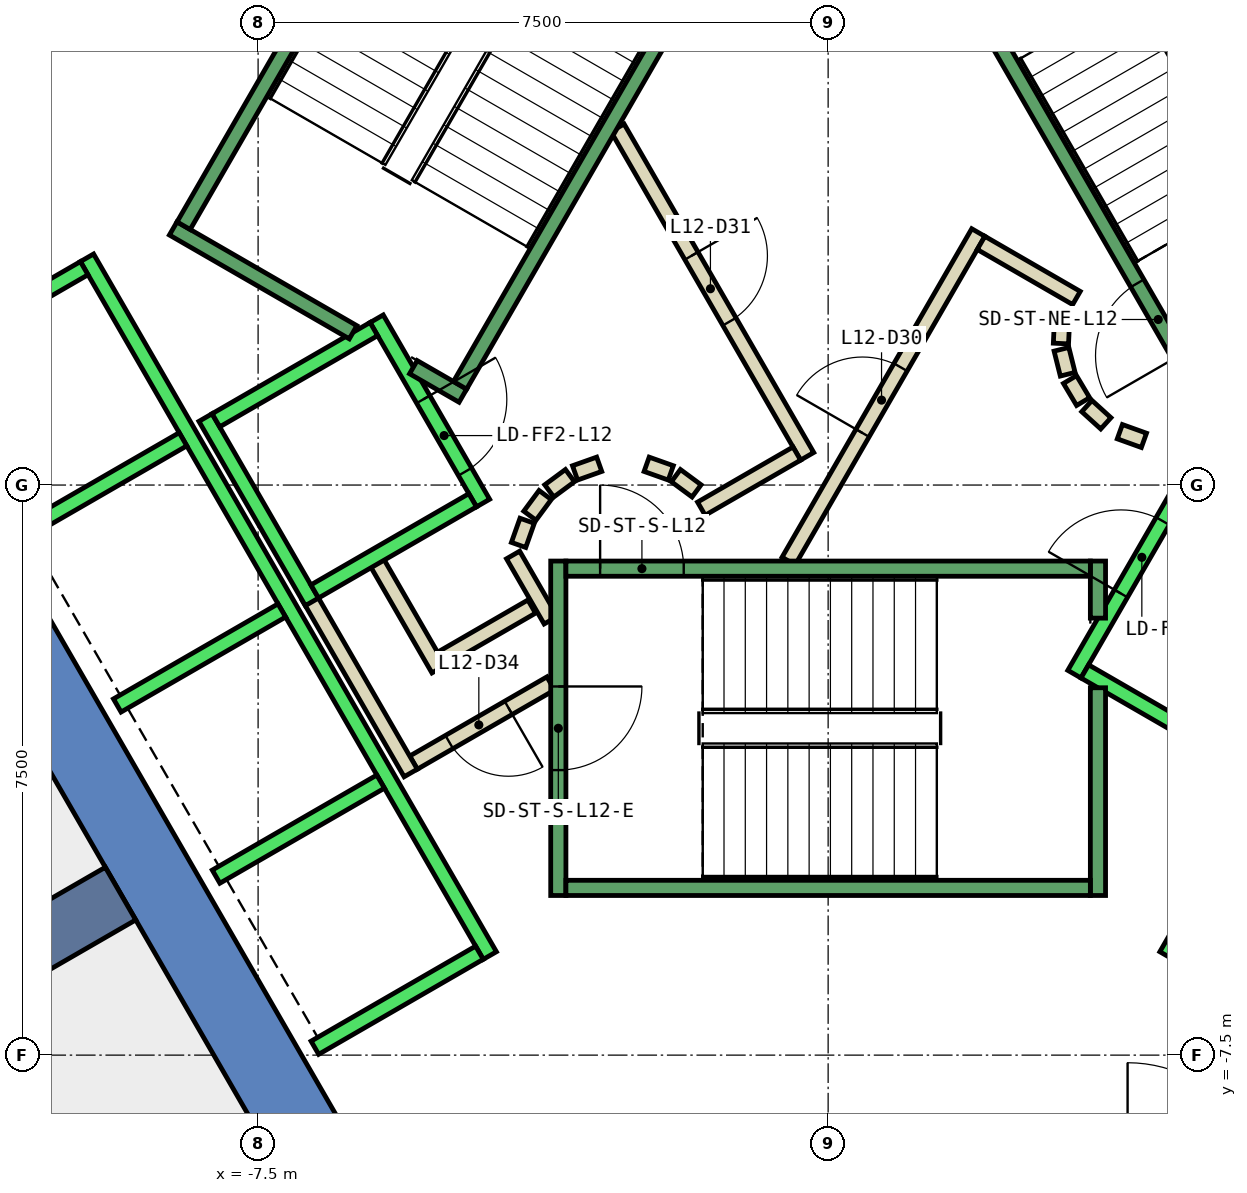
"""IFC4 building model, lengths in metres.
Left out: names, types, materials, properties, quantities, classifications, styles, units other than length and angle.
Written with IfcOpenShell. Run it as: python <this file> out.ifc"""

import sys

from ifc_helpers import new_model, si_unit, direction, frame, frame_2d, origin, place, context, subcontext, project, spatial, polyline, rectangle, outline, extrude, element, fill, save


model = new_model("IFC4")
c1 = context("Model", 3, precision=1e-05, world=origin(), true_north=direction((0.0, 1.0)))
c2 = subcontext(c1, "Body", "Model", "MODEL_VIEW")
j1 = project(units=[si_unit("LENGTHUNIT", "METRE"), si_unit("PLANEANGLEUNIT", "RADIAN")], contexts=[c1])
p1 = place(None, origin())
s1 = spatial("IfcSite", under=j1, at=p1, CompositionType="ELEMENT")
p2 = place(p1, origin())
s2 = spatial("IfcBuilding", under=s1, at=p2, CompositionType="ELEMENT")
p3 = place(p2, frame((0.0, 0.0, 60.2)))
s3 = spatial("IfcBuildingStorey", under=s2, at=p3, CompositionType="ELEMENT", Elevation=60.2)
p4 = place(p3, frame((0.0, 0.0, -0.4)))
e1 = element("IfcWall", 1, at=p4, inside=s3, PredefinedType="SHEAR", context=c2, shape_type="SweptSolid", body=[
    extrude(outline(polyline([(-12.267, 5.252), (-11.402, 4.752), (-6.351, 13.5), (-6.928, 14.5), (-12.267, 5.252)])), origin(), (0.0, 0.0, 1.0), 4.2),
])
p5 = place(p3, frame((0.0, 0.0, -0.4)))
e2 = element("IfcWall", 2, at=p5, inside=s3, PredefinedType="SHEAR", context=c2, shape_type="SweptSolid", body=[
    extrude(outline(polyline([(-13.856, 2.5), (-6.928, -9.5), (-6.351, -8.5), (-12.702, 2.5), (-13.856, 2.5)])), origin(), (0.0, 0.0, 1.0), 4.2),
])
p6 = place(p3, frame((-9.31, -5.375, -0.4), z_axis=(0.0, 0.0, 1.0), x_axis=(-0.866017533419, -0.500013631625, 0.0)))
e3 = element("IfcWall", 3, at=p6, inside=s3, PredefinedType="SHEAR", context=c2, shape_type="SweptSolid", body=[
    extrude(rectangle(XDim=9.0, YDim=0.8, at=frame_2d((4.5, 0.0))), origin(), (0.0, 0.0, 1.0), 4.2),
])
p7 = place(p3, frame((-3.9, -1.599, 0.0), z_axis=(0.0, 0.0, 1.0), x_axis=(-0.865969445389, -0.500096910261, 0.0)))
e4 = element("IfcWall", 4, at=p7, inside=s3, PredefinedType="PARTITIONING", context=c2, shape_type="SweptSolid", body=[
    extrude(rectangle(XDim=1.373, YDim=0.2, at=frame_2d((0.687, 0.0))), origin(), (0.0, 0.0, 1.0), 3.8),
])
p8 = place(p3, frame((-5.126, -2.422, 0.0), z_axis=(0.0, 0.0, 1.0), x_axis=(-0.500062241894, 0.865989465428, 0.0)))
e5 = element("IfcWall", 5, at=p8, inside=s3, PredefinedType="PARTITIONING", context=c2, shape_type="SweptSolid", body=[
    extrude(rectangle(XDim=1.7, YDim=0.2, at=frame_2d((0.85, 0.0))), origin(), (0.0, 0.0, 1.0), 3.8),
])
p9 = place(p3, frame((-3.65, -2.61, 0.0), z_axis=(0.0, 0.0, 1.0), x_axis=(-0.866072462134, -0.499918483688, 0.0)))
e6 = element("IfcWall", 6, at=p9, inside=s3, PredefinedType="PARTITIONING", context=c2, shape_type="SweptSolid", body=[
    extrude(rectangle(XDim=2.084, YDim=0.2, at=frame_2d((1.042, 0.0))), origin(), (0.0, 0.0, 1.0), 3.8),
])
p10 = place(p9, frame((0.642, 0.0, 0.0)))
e7 = element("IfcOpeningElement", 7, at=p10, cuts=e6, PredefinedType="OPENING", context=c2, shape_type="SweptSolid", body=[
    extrude(rectangle(XDim=0.9, YDim=2.1, at=frame_2d((0.45, 1.05))), frame((0.0, 0.11, 0.0), z_axis=(0.0, -1.0, 0.0), x_axis=(1.0, 0.0, 0.0)), (0.0, 0.0, 1.0), 0.22),
])
p11 = place(p3, frame((-5.492, -3.788, 0.0), z_axis=(0.0, 0.0, 1.0), x_axis=(-0.500008949224, 0.866020236886, 0.0)))
e8 = element("IfcWall", 8, at=p11, inside=s3, PredefinedType="PARTITIONING", context=c2, shape_type="SweptSolid", body=[
    extrude(rectangle(XDim=2.68, YDim=0.2, at=frame_2d((1.34, 0.0))), origin(), (0.0, 0.0, 1.0), 3.8),
])
p12 = place(p3, frame((-4.145, -0.92, 0.0), z_axis=(0.0, 0.0, 1.0), x_axis=(0.499743786207, -0.866173278362, 0.0)))
e9 = element("IfcWall", 9, at=p12, inside=s3, PredefinedType="PARTITIONING", context=c2, shape_type="SweptSolid", body=[
    extrude(rectangle(XDim=0.991, YDim=0.2, at=frame_2d((0.495, 0.0))), origin(), (0.0, 0.0, 1.0), 3.8),
])
p13 = place(p3, frame((-0.52, -1.0, 0.0), z_axis=(0.0, 0.0, 1.0), x_axis=(0.50011622646, 0.865958290007, 0.0)))
e10 = element("IfcWall", 10, at=p13, inside=s3, PredefinedType="PARTITIONING", context=c2, shape_type="SweptSolid", body=[
    extrude(rectangle(XDim=4.991, YDim=0.2, at=frame_2d((2.496, 0.0))), origin(), (0.0, 0.0, 1.0), 3.8),
])
p14 = place(p13, frame((1.945, 0.0, 0.0)))
e11 = element("IfcOpeningElement", 11, at=p14, cuts=e10, PredefinedType="OPENING", context=c2, shape_type="SweptSolid", body=[
    extrude(rectangle(XDim=1.0, YDim=2.1, at=frame_2d((0.5, 1.05))), frame((0.0, 0.11, 0.0), z_axis=(0.0, -1.0, 0.0), x_axis=(1.0, 0.0, 0.0)), (0.0, 0.0, 1.0), 0.22),
])
p15 = place(p3, frame((2.012, 3.186, 0.0), z_axis=(0.0, 0.0, 1.0), x_axis=(0.865891012941, -0.500232699559, 0.0)))
e12 = element("IfcWall", 12, at=p15, inside=s3, PredefinedType="PARTITIONING", context=c2, shape_type="SweptSolid", body=[
    extrude(rectangle(XDim=1.449, YDim=0.2, at=frame_2d((0.725, 0.0))), origin(), (0.0, 0.0, 1.0), 3.8),
])
p16 = place(p3, frame((3.079, 2.199, 0.0), z_axis=(0.0, 0.0, 1.0), x_axis=(-0.047771483479, -0.998858290933, 0.0)))
e13 = element("IfcWall", 13, at=p16, inside=s3, PredefinedType="PARTITIONING", context=c2, shape_type="SweptSolid", body=[
    extrude(rectangle(XDim=0.337, YDim=0.2, at=frame_2d((0.169, 0.0))), origin(), (0.0, 0.0, 1.0), 3.8),
])
p17 = place(p3, frame((3.07, 1.786, 0.0), z_axis=(0.0, 0.0, 1.0), x_axis=(0.242705583207, -0.970099994784, 0.0)))
e14 = element("IfcWall", 14, at=p17, inside=s3, PredefinedType="PARTITIONING", context=c2, shape_type="SweptSolid", body=[
    extrude(rectangle(XDim=0.338, YDim=0.2, at=frame_2d((0.169, 0.0))), origin(), (0.0, 0.0, 1.0), 3.8),
])
for number, where, z_axis, x_axis in (
    (15, (3.182, 1.388, 0.0), (0.0, 0.0, 1.0), (0.512, -0.859, 0.0)),
    (16, (3.404, 1.039, 0.0), (0.0, 0.0, 1.0), (0.74, -0.672, 0.0)),
):
    element("IfcWall", number, at=place(p3, frame(where, z_axis=z_axis, x_axis=x_axis)), inside=s3, PredefinedType="PARTITIONING", context=c2, shape_type="SweptSolid", body=[
        extrude(rectangle(XDim=0.338, YDim=0.2, at=frame_2d((0.169, 0.0))), origin(), (0.0, 0.0, 1.0), 3.8),
    ])
p18 = place(p3, frame((3.838, 0.702, 0.0), z_axis=(0.0, 0.0, 1.0), x_axis=(0.941035081519, -0.338308993895, 0.0)))
e17 = element("IfcWall", 17, at=p18, inside=s3, PredefinedType="PARTITIONING", context=c2, shape_type="SweptSolid", body=[
    extrude(rectangle(XDim=0.337, YDim=0.2, at=frame_2d((0.168, 0.0))), origin(), (0.0, 0.0, 1.0), 3.8),
])
p19 = place(p3, frame((-2.771, 4.7, 0.0), z_axis=(0.0, 0.0, 1.0), x_axis=(0.499969479948, -0.866043023828, 0.0)))
e18 = element("IfcWall", 18, at=p19, inside=s3, PredefinedType="PARTITIONING", context=c2, shape_type="SweptSolid", body=[
    extrude(rectangle(XDim=4.99, YDim=0.2, at=frame_2d((2.495, 0.0))), origin(), (0.0, 0.0, 1.0), 3.8),
])
p20 = place(p19, frame((1.945, 0.0, 0.0)))
e19 = element("IfcOpeningElement", 19, at=p20, cuts=e18, PredefinedType="OPENING", context=c2, shape_type="SweptSolid", body=[
    extrude(rectangle(XDim=1.0, YDim=2.1, at=frame_2d((0.5, 1.05))), frame((0.0, 0.11, 0.0), z_axis=(0.0, -1.0, 0.0), x_axis=(1.0, 0.0, 0.0)), (0.0, 0.0, 1.0), 0.22),
])
p21 = place(p3, frame((-0.412, 0.414, 0.0), z_axis=(0.0, 0.0, 1.0), x_axis=(-0.866017369001, -0.500013916395, 0.0)))
e20 = element("IfcWall", 20, at=p21, inside=s3, PredefinedType="PARTITIONING", context=c2, shape_type="SweptSolid", body=[
    extrude(rectangle(XDim=1.45, YDim=0.2, at=frame_2d((0.725, 0.0))), origin(), (0.0, 0.0, 1.0), 3.8),
])
p22 = place(p3, frame((-1.731, -0.077, 0.0), z_axis=(0.0, 0.0, 1.0), x_axis=(-0.804311165252, 0.594208338422, 0.0)))
e21 = element("IfcWall", 21, at=p22, inside=s3, PredefinedType="PARTITIONING", context=c2, shape_type="SweptSolid", body=[
    extrude(rectangle(XDim=0.338, YDim=0.2, at=frame_2d((0.169, 0.0))), origin(), (0.0, 0.0, 1.0), 3.8),
])
p23 = place(p3, frame((-2.07, 0.16, 0.0), z_axis=(0.0, 0.0, 1.0), x_axis=(-0.942199461132, 0.335052496547, 0.0)))
e22 = element("IfcWall", 22, at=p23, inside=s3, PredefinedType="PARTITIONING", context=c2, shape_type="SweptSolid", body=[
    extrude(rectangle(XDim=0.337, YDim=0.2, at=frame_2d((0.169, 0.0))), origin(), (0.0, 0.0, 1.0), 3.8),
])
p24 = place(p3, frame((-3.012, 0.273, 0.0), z_axis=(0.0, 0.0, 1.0), x_axis=(-0.942280615813, -0.334824194261, 0.0)))
e23 = element("IfcWall", 23, at=p24, inside=s3, PredefinedType="PARTITIONING", context=c2, shape_type="SweptSolid", body=[
    extrude(rectangle(XDim=0.338, YDim=0.2, at=frame_2d((0.169, 0.0))), origin(), (0.0, 0.0, 1.0), 3.8),
])
p25 = place(p3, frame((-3.397, 0.124, 0.0), z_axis=(0.0, 0.0, 1.0), x_axis=(-0.804311165252, -0.594208338422, 0.0)))
e24 = element("IfcWall", 24, at=p25, inside=s3, PredefinedType="PARTITIONING", context=c2, shape_type="SweptSolid", body=[
    extrude(rectangle(XDim=0.338, YDim=0.2, at=frame_2d((0.169, 0.0))), origin(), (0.0, 0.0, 1.0), 3.8),
])
p26 = place(p3, frame((-3.723, -0.131, 0.0), z_axis=(0.0, 0.0, 1.0), x_axis=(-0.594675113454, -0.803966112121, 0.0)))
e25 = element("IfcWall", 25, at=p26, inside=s3, PredefinedType="PARTITIONING", context=c2, shape_type="SweptSolid", body=[
    extrude(rectangle(XDim=0.338, YDim=0.2, at=frame_2d((0.169, 0.0))), origin(), (0.0, 0.0, 1.0), 3.8),
])
p27 = place(p3, frame((-3.96, -0.47, 0.0), z_axis=(0.0, 0.0, 1.0), x_axis=(-0.334824194261, -0.942280615813, 0.0)))
e26 = element("IfcWall", 26, at=p27, inside=s3, PredefinedType="PARTITIONING", context=c2, shape_type="SweptSolid", body=[
    extrude(rectangle(XDim=0.338, YDim=0.2, at=frame_2d((0.169, 0.0))), origin(), (0.0, 0.0, 1.0), 3.8),
])
p28 = place(p3, frame((-5.94, 2.188, 0.0), z_axis=(0.0, 0.0, 1.0), x_axis=(0.49994636267, -0.866056369097, 0.0)))
e27 = element("IfcWall", 27, at=p28, inside=s3, PredefinedType="STANDARD", context=c2, shape_type="SweptSolid", body=[
    extrude(rectangle(XDim=2.8, YDim=0.2, at=frame_2d((1.4, 0.0))), origin(), (0.0, 0.0, 1.0), 3.8),
])
p29 = place(p28, frame((1.225, 0.0, 0.0)))
e28 = element("IfcOpeningElement", 28, at=p29, cuts=e27, PredefinedType="OPENING", context=c2, shape_type="SweptSolid", body=[
    extrude(rectangle(XDim=1.1, YDim=2.1, at=frame_2d((0.55, 1.05))), frame((0.0, 0.11, 0.0), z_axis=(0.0, -1.0, 0.0), x_axis=(1.0, 0.0, 0.0)), (0.0, 0.0, 1.0), 0.22),
])
p30 = place(p3, frame((-8.192, 0.888, 0.0), z_axis=(0.0, 0.0, 1.0), x_axis=(0.49994636267, -0.866056369097, 0.0)))
e29 = element("IfcWall", 29, at=p30, inside=s3, PredefinedType="STANDARD", context=c2, shape_type="SweptSolid", body=[
    extrude(rectangle(XDim=2.8, YDim=0.2, at=frame_2d((1.4, 0.0))), origin(), (0.0, 0.0, 1.0), 3.8),
])
for number, where, z_axis, x_axis in (
    (30, (-5.977, 2.052, 0.0), (0.0, 0.0, 1.0), (-0.866, -0.5, 0.0)),
    (31, (-4.677, -0.2, 0.0), (0.0, 0.0, 1.0), (-0.866, -0.5, 0.0)),
):
    element("IfcWall", number, at=place(p3, frame(where, z_axis=z_axis, x_axis=x_axis)), inside=s3, PredefinedType="STANDARD", context=c2, shape_type="SweptSolid", body=[
        extrude(rectangle(XDim=2.399, YDim=0.2, at=frame_2d((1.2, 0.0))), origin(), (0.0, 0.0, 1.0), 3.8),
    ])
p31 = place(p3, frame((-9.751, 2.99, 0.0), z_axis=(0.0, 0.0, 1.0), x_axis=(0.50000090737, -0.866024879913, 0.0)))
e32 = element("IfcWall", 32, at=p31, inside=s3, PredefinedType="STANDARD", context=c2, shape_type="SweptSolid", body=[
    extrude(rectangle(XDim=10.6, YDim=0.2, at=frame_2d((5.3, 0.0))), origin(), (0.0, 0.0, 1.0), 3.8),
])
p32 = place(p3, frame((-9.788, 2.853, 0.0), z_axis=(0.0, 0.0, 1.0), x_axis=(-0.865998541277, -0.500046524342, 0.0)))
e33 = element("IfcWall", 33, at=p32, inside=s3, PredefinedType="STANDARD", context=c2, shape_type="SweptSolid", body=[
    extrude(rectangle(XDim=2.5, YDim=0.2, at=frame_2d((1.25, 0.0))), origin(), (0.0, 0.0, 1.0), 3.8),
])
for number, where, z_axis, x_axis in (
    (34, (-8.488, 0.602, 0.0), (0.0, 0.0, 1.0), (-0.866, -0.5, 0.0)),
    (35, (-7.188, -1.65, 0.0), (0.0, 0.0, 1.0), (-0.866, -0.5, 0.0)),
    (36, (-5.888, -3.902, 0.0), (0.0, 0.0, 1.0), (-0.866, -0.5, 0.0)),
    (37, (-4.588, -6.153, 0.0), (0.0, 0.0, 1.0), (-0.866, -0.5, 0.0)),
):
    element("IfcWall", number, at=place(p3, frame(where, z_axis=z_axis, x_axis=x_axis)), inside=s3, PredefinedType="STANDARD", context=c2, shape_type="SweptSolid", body=[
        extrude(rectangle(XDim=2.5, YDim=0.2, at=frame_2d((1.25, 0.0))), origin(), (0.0, 0.0, 1.0), 3.8),
    ])
p33 = place(p3, frame((3.24, -2.488, 0.0), z_axis=(0.0, 0.0, 1.0), x_axis=(0.49994636267, 0.866056369097, 0.0)))
e38 = element("IfcWall", 38, at=p33, inside=s3, PredefinedType="STANDARD", context=c2, shape_type="SweptSolid", body=[
    extrude(rectangle(XDim=2.8, YDim=0.2, at=frame_2d((1.4, 0.0))), origin(), (0.0, 0.0, 1.0), 3.8),
])
p34 = place(p33, frame((1.225, 0.0, 0.0)))
e39 = element("IfcOpeningElement", 39, at=p34, cuts=e38, PredefinedType="OPENING", context=c2, shape_type="SweptSolid", body=[
    extrude(rectangle(XDim=1.1, YDim=2.1, at=frame_2d((0.55, 1.05))), frame((0.0, 0.11, 0.0), z_axis=(0.0, -1.0, 0.0), x_axis=(1.0, 0.0, 0.0)), (0.0, 0.0, 1.0), 0.22),
])
p35 = place(p3, frame((3.377, -2.452, 0.0), z_axis=(0.0, 0.0, 1.0), x_axis=(0.865955154139, -0.50012165622, 0.0)))
e40 = element("IfcWall", 40, at=p35, inside=s3, PredefinedType="STANDARD", context=c2, shape_type="SweptSolid", body=[
    extrude(rectangle(XDim=2.4, YDim=0.2, at=frame_2d((1.2, 0.0))), origin(), (0.0, 0.0, 1.0), 3.8),
])
p36 = place(p3, frame((4.451, -6.19, 0.0), z_axis=(0.0, 0.0, 1.0), x_axis=(0.50000090737, 0.866024879913, 0.0)))
e41 = element("IfcWall", 41, at=p36, inside=s3, PredefinedType="STANDARD", context=c2, shape_type="SweptSolid", body=[
    extrude(rectangle(XDim=10.6, YDim=0.2, at=frame_2d((5.3, 0.0))), origin(), (0.0, 0.0, 1.0), 3.8),
])
p37 = place(p3, frame((-3.55, -1.0, 0.0), z_axis=(0.0, 0.0, 1.0), x_axis=(0.0, -1.0, 0.0)))
e42 = element("IfcWall", 42, at=p37, inside=s3, PredefinedType="STANDARD", context=c2, shape_type="SweptSolid", body=[
    extrude(rectangle(XDim=4.4, YDim=0.2, at=frame_2d((2.2, 0.0))), origin(), (0.0, 0.0, 1.0), 3.8),
])
p38 = place(p37, frame((1.65, 0.0, 0.0)))
e43 = element("IfcOpeningElement", 43, at=p38, cuts=e42, PredefinedType="OPENING", context=c2, shape_type="SweptSolid", body=[
    extrude(rectangle(XDim=1.1, YDim=2.2, at=frame_2d((0.55, 1.1))), frame((0.0, 0.11, 0.0), z_axis=(0.0, -1.0, 0.0), x_axis=(1.0, 0.0, 0.0)), (0.0, 0.0, 1.0), 0.22),
])
p39 = place(p3, frame((3.55, -2.667, 0.0), z_axis=(0.0, 0.0, 1.0), x_axis=(0.0, -1.0, 0.0)))
e44 = element("IfcWall", 44, at=p39, inside=s3, PredefinedType="STANDARD", context=c2, shape_type="SweptSolid", body=[
    extrude(rectangle(XDim=2.733, YDim=0.2, at=frame_2d((1.366, 0.0))), origin(), (0.0, 0.0, 1.0), 3.8),
])
p40 = place(p3, frame((3.55, -1.0, 0.0), z_axis=(0.0, 0.0, 1.0), x_axis=(0.0, -1.0, 0.0)))
e45 = element("IfcWall", 45, at=p40, inside=s3, PredefinedType="STANDARD", context=c2, shape_type="SweptSolid", body=[
    extrude(rectangle(XDim=0.751, YDim=0.2, at=frame_2d((0.375, 0.0))), origin(), (0.0, 0.0, 1.0), 3.8),
])
p41 = place(p3, frame((-3.45, -1.1, 0.0), z_axis=(0.0, 0.0, 1.0), x_axis=(1.0, 0.0, 0.0)))
e46 = element("IfcWall", 46, at=p41, inside=s3, PredefinedType="STANDARD", context=c2, shape_type="SweptSolid", body=[
    extrude(rectangle(XDim=6.9, YDim=0.2, at=frame_2d((3.45, 0.0))), origin(), (0.0, 0.0, 1.0), 3.8),
])
p42 = place(p41, frame((0.45, 0.0, 0.0)))
e47 = element("IfcOpeningElement", 47, at=p42, cuts=e46, PredefinedType="OPENING", context=c2, shape_type="SweptSolid", body=[
    extrude(rectangle(XDim=1.1, YDim=2.2, at=frame_2d((0.55, 1.1))), frame((0.0, 0.11, 0.0), z_axis=(0.0, -1.0, 0.0), x_axis=(1.0, 0.0, 0.0)), (0.0, 0.0, 1.0), 0.22),
])
p43 = place(p3, frame((-3.45, -5.3, 0.0), z_axis=(0.0, 0.0, 1.0), x_axis=(1.0, 0.0, 0.0)))
e48 = element("IfcWall", 48, at=p43, inside=s3, PredefinedType="STANDARD", context=c2, shape_type="SweptSolid", body=[
    extrude(rectangle(XDim=6.9, YDim=0.2, at=frame_2d((3.45, 0.0))), origin(), (0.0, 0.0, 1.0), 3.8),
])
p44 = place(p3, frame((4.843, 1.312, 0.0), z_axis=(0.0, 0.0, 1.0), x_axis=(-0.499963383562, 0.866046543262, 0.0)))
e49 = element("IfcWall", 49, at=p44, inside=s3, PredefinedType="STANDARD", context=c2, shape_type="SweptSolid", body=[
    extrude(rectangle(XDim=6.9, YDim=0.2, at=frame_2d((3.45, 0.0))), origin(), (0.0, 0.0, 1.0), 3.8),
])
p45 = place(p44, frame((0.45, 0.0, 0.0)))
e50 = element("IfcOpeningElement", 50, at=p45, cuts=e49, PredefinedType="OPENING", context=c2, shape_type="SweptSolid", body=[
    extrude(rectangle(XDim=1.1, YDim=2.2, at=frame_2d((0.55, 1.1))), frame((0.0, 0.11, 0.0), z_axis=(0.0, -1.0, 0.0), x_axis=(1.0, 0.0, 0.0)), (0.0, 0.0, 1.0), 0.22),
])
p46 = place(p3, frame((-6.25, 2.01, 0.0), z_axis=(0.0, 0.0, 1.0), x_axis=(-0.86611865017, 0.499838457731, 0.0)))
e51 = element("IfcWall", 51, at=p46, inside=s3, PredefinedType="STANDARD", context=c2, shape_type="SweptSolid", body=[
    extrude(rectangle(XDim=2.733, YDim=0.2, at=frame_2d((1.366, 0.0))), origin(), (0.0, 0.0, 1.0), 3.8),
])
p47 = place(p3, frame((-4.806, 1.176, 0.0), z_axis=(0.0, 0.0, 1.0), x_axis=(-0.866558586415, 0.499075361355, 0.0)))
e52 = element("IfcWall", 52, at=p47, inside=s3, PredefinedType="STANDARD", context=c2, shape_type="SweptSolid", body=[
    extrude(rectangle(XDim=0.751, YDim=0.2, at=frame_2d((0.376, 0.0))), origin(), (0.0, 0.0, 1.0), 3.8),
])
p48 = place(p3, frame((-1.393, 7.288, 0.0), z_axis=(0.0, 0.0, 1.0), x_axis=(-0.499963383562, -0.866046543262, 0.0)))
e53 = element("IfcWall", 53, at=p48, inside=s3, PredefinedType="STANDARD", context=c2, shape_type="SweptSolid", body=[
    extrude(rectangle(XDim=6.9, YDim=0.2, at=frame_2d((3.45, 0.0))), origin(), (0.0, 0.0, 1.0), 3.8),
])
p49 = place(p48, frame((0.45, 0.0, 0.0)))
e54 = element("IfcOpeningElement", 54, at=p49, cuts=e53, PredefinedType="OPENING", context=c2, shape_type="SweptSolid", body=[
    extrude(rectangle(XDim=1.1, YDim=2.2, at=frame_2d((0.55, 1.1))), frame((0.0, 0.11, 0.0), z_axis=(0.0, -1.0, 0.0), x_axis=(1.0, 0.0, 0.0)), (0.0, 0.0, 1.0), 0.22),
])
p50 = place(p3, frame((-5.03, 9.388, 0.0), z_axis=(0.0, 0.0, 1.0), x_axis=(-0.499978703459, -0.866037698999, 0.0)))
e55 = element("IfcWall", 55, at=p50, inside=s3, PredefinedType="STANDARD", context=c2, shape_type="SweptSolid", body=[
    extrude(rectangle(XDim=6.9, YDim=0.2, at=frame_2d((3.45, 0.0))), origin(), (0.0, 0.0, 1.0), 3.8),
])
p51 = place(p14, origin())
e56 = element("IfcDoor", 56, at=p51, inside=s3, OperationType="SINGLE_SWING_LEFT", PredefinedType="DOOR", context=c2, shape_type="SweptSolid", body=[
    extrude(rectangle(XDim=1.0, YDim=2.1, at=frame_2d((0.5, 1.05))), frame((0.0, 0.025, 0.0), z_axis=(0.0, -1.0, 0.0), x_axis=(1.0, 0.0, 0.0)), (0.0, 0.0, 1.0), 0.05),
])
fill(e11, e56)
p52 = place(p20, origin())
e57 = element("IfcDoor", 57, at=p52, inside=s3, OperationType="SINGLE_SWING_RIGHT", PredefinedType="DOOR", context=c2, shape_type="SweptSolid", body=[
    extrude(rectangle(XDim=1.0, YDim=2.1, at=frame_2d((0.5, 1.05))), frame((0.0, 0.025, 0.0), z_axis=(0.0, -1.0, 0.0), x_axis=(1.0, 0.0, 0.0)), (0.0, 0.0, 1.0), 0.05),
])
fill(e19, e57)
p53 = place(p10, origin())
e58 = element("IfcDoor", 58, at=p53, inside=s3, OperationType="SINGLE_SWING_LEFT", PredefinedType="DOOR", context=c2, shape_type="SweptSolid", body=[
    extrude(rectangle(XDim=0.9, YDim=2.1, at=frame_2d((0.45, 1.05))), frame((0.0, 0.025, 0.0), z_axis=(0.0, -1.0, 0.0), x_axis=(1.0, 0.0, 0.0)), (0.0, 0.0, 1.0), 0.05),
])
fill(e7, e58)
p54 = place(p34, origin())
e59 = element("IfcDoor", 59, at=p54, inside=s3, OperationType="SLIDING_TO_LEFT", PredefinedType="DOOR", context=c2, shape_type="SweptSolid", body=[
    extrude(rectangle(XDim=1.1, YDim=2.1, at=frame_2d((0.55, 1.05))), frame((0.0, 0.025, 0.0), z_axis=(0.0, -1.0, 0.0), x_axis=(1.0, 0.0, 0.0)), (0.0, 0.0, 1.0), 0.05),
])
fill(e39, e59)
p55 = place(p29, origin())
e60 = element("IfcDoor", 60, at=p55, inside=s3, OperationType="SLIDING_TO_LEFT", PredefinedType="DOOR", context=c2, shape_type="SweptSolid", body=[
    extrude(rectangle(XDim=1.1, YDim=2.1, at=frame_2d((0.55, 1.05))), frame((0.0, 0.025, 0.0), z_axis=(0.0, -1.0, 0.0), x_axis=(1.0, 0.0, 0.0)), (0.0, 0.0, 1.0), 0.05),
])
fill(e28, e60)
p56 = place(p42, origin())
e61 = element("IfcDoor", 61, at=p56, inside=s3, OperationType="SINGLE_SWING_LEFT", PredefinedType="DOOR", context=c2, shape_type="SweptSolid", body=[
    extrude(rectangle(XDim=1.1, YDim=2.2, at=frame_2d((0.55, 1.1))), frame((0.0, 0.025, 0.0), z_axis=(0.0, -1.0, 0.0), x_axis=(1.0, 0.0, 0.0)), (0.0, 0.0, 1.0), 0.05),
])
fill(e47, e61)
p57 = place(p38, origin())
e62 = element("IfcDoor", 62, at=p57, inside=s3, OperationType="SINGLE_SWING_LEFT", PredefinedType="DOOR", context=c2, shape_type="SweptSolid", body=[
    extrude(rectangle(XDim=1.1, YDim=2.2, at=frame_2d((0.55, 1.1))), frame((0.0, 0.025, 0.0), z_axis=(0.0, -1.0, 0.0), x_axis=(1.0, 0.0, 0.0)), (0.0, 0.0, 1.0), 0.05),
])
fill(e43, e62)
p58 = place(p45, origin())
e63 = element("IfcDoor", 63, at=p58, inside=s3, OperationType="SINGLE_SWING_LEFT", PredefinedType="DOOR", context=c2, shape_type="SweptSolid", body=[
    extrude(rectangle(XDim=1.1, YDim=2.2, at=frame_2d((0.55, 1.1))), frame((0.0, 0.025, 0.0), z_axis=(0.0, -1.0, 0.0), x_axis=(1.0, 0.0, 0.0)), (0.0, 0.0, 1.0), 0.05),
])
fill(e50, e63)
save(model, sys.argv[1])
